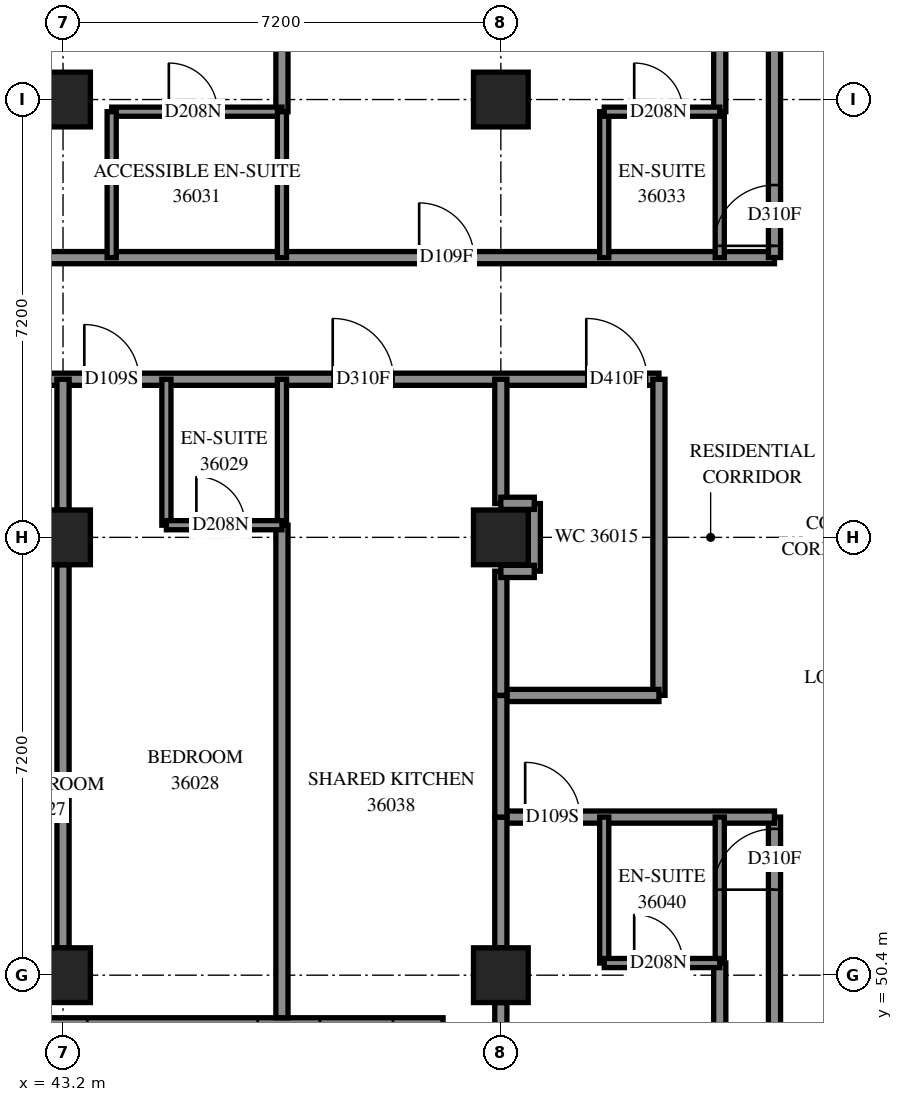
"""IFC4 building model, lengths in metres.
Left out: names, types, materials, properties, quantities, classifications, styles, units other than length and angle.
Written with IfcOpenShell. Run it as: python <this file> out.ifc"""

import sys

from ifc_helpers import new_model, si_unit, direction, frame, frame_2d, origin, origin_2d, place, context, subcontext, project, spatial, polyline, rectangle, outline, extrude, element, fill, save


model = new_model("IFC4")
c1 = context("Model", 3, precision=1e-05, world=origin(), true_north=direction((0.0, 1.0)))
c2 = subcontext(c1, "Body", "Model", "MODEL_VIEW")
j1 = project(units=[si_unit("LENGTHUNIT", "METRE"), si_unit("PLANEANGLEUNIT", "RADIAN")], contexts=[c1])
p1 = place(None, origin())
s1 = spatial("IfcSite", under=j1, at=p1, CompositionType="ELEMENT")
p2 = place(p1, origin())
s2 = spatial("IfcBuilding", under=s1, at=p2, CompositionType="ELEMENT")
p3 = place(p2, frame((0.0, 0.0, 135.4)))
s3 = spatial("IfcBuildingStorey", under=s2, at=p3, CompositionType="ELEMENT", Elevation=135.4)
for number, where, z_axis, x_axis in (
    (1, (43.2, 50.4, 0.0), (0.0, 0.0, 1.0), (1.0, 0.0, 0.0)),
    (2, (43.2, 57.6, 0.0), (0.0, 0.0, 1.0), (1.0, 0.0, 0.0)),
    (3, (43.2, 64.8, 0.0), (0.0, 0.0, 1.0), (1.0, 0.0, 0.0)),
    (4, (50.4, 50.4, 0.0), (0.0, 0.0, 1.0), (1.0, 0.0, 0.0)),
    (5, (50.4, 57.6, 0.0), (0.0, 0.0, 1.0), (1.0, 0.0, 0.0)),
    (6, (50.4, 64.8, 0.0), (0.0, 0.0, 1.0), (1.0, 0.0, 0.0)),
):
    element("IfcColumn", number, at=place(p3, frame(where, z_axis=z_axis, x_axis=x_axis)), inside=s3, PredefinedType="COLUMN", context=c2, shape_type="SweptSolid", body=[
        extrude(rectangle(XDim=0.9, YDim=0.9, at=origin_2d()), origin(), (0.0, 0.0, 1.0), 3.1),
    ])
p4 = place(p3, frame((42.25, 49.45, 0.0), z_axis=(0.0, 0.0, 1.0), x_axis=(1.0, 0.0, 0.0)))
e7 = element("IfcWall", 7, at=p4, inside=s3, PredefinedType="SOLIDWALL", context=c2, shape_type="SweptSolid", body=[
    extrude(outline(polyline([(-0.25, -0.25), (6.95, -0.25), (7.45, 0.25), (0.25, 0.25), (-0.25, -0.25)])), origin(), (0.0, 0.0, 1.0), 3.1),
])
p5 = place(p4, frame((1.35, 0.0, 0.45)))
e8 = element("IfcOpeningElement", 8, at=p5, cuts=e7, PredefinedType="OPENING", context=c2, shape_type="SweptSolid", body=[
    extrude(rectangle(XDim=2.8, YDim=2.5, at=frame_2d((1.4, 1.25))), frame((0.0, 0.26, 0.0), z_axis=(0.0, -1.0, 0.0), x_axis=(1.0, 0.0, 0.0)), (0.0, 0.0, 1.0), 0.52),
])
p6 = place(p4, frame((5.175, 0.0, 0.45)))
e9 = element("IfcOpeningElement", 9, at=p6, cuts=e7, PredefinedType="OPENING", context=c2, shape_type="SweptSolid", body=[
    extrude(rectangle(XDim=1.2, YDim=2.5, at=frame_2d((0.6, 1.25))), frame((0.0, 0.26, 0.0), z_axis=(0.0, -1.0, 0.0), x_axis=(1.0, 0.0, 0.0)), (0.0, 0.0, 1.0), 0.52),
])
p7 = place(p3, frame((49.45, 49.45, 0.0), z_axis=(0.0, 0.0, 1.0), x_axis=(0.0, -1.0, 0.0)))
e10 = element("IfcWall", 10, at=p7, inside=s3, PredefinedType="SOLIDWALL", context=c2, shape_type="SweptSolid", body=[
    extrude(outline(polyline([(0.25, -0.25), (8.35, -0.25), (7.702, 0.25), (-0.25, 0.25), (0.25, -0.25)])), origin(), (0.0, 0.0, 1.0), 3.1),
])
p8 = place(p7, frame((3.05, 0.0, 0.45)))
e11 = element("IfcOpeningElement", 11, at=p8, cuts=e10, PredefinedType="OPENING", context=c2, shape_type="SweptSolid", body=[
    extrude(rectangle(XDim=2.8, YDim=2.5, at=frame_2d((1.4, 1.25))), frame((0.0, 0.26, 0.0), z_axis=(0.0, -1.0, 0.0), x_axis=(1.0, 0.0, 0.0)), (0.0, 0.0, 1.0), 0.52),
])
p9 = place(p7, frame((0.825, 0.0, 0.45)))
e12 = element("IfcOpeningElement", 12, at=p9, cuts=e10, PredefinedType="OPENING", context=c2, shape_type="SweptSolid", body=[
    extrude(rectangle(XDim=1.2, YDim=2.5, at=frame_2d((0.6, 1.25))), frame((0.0, 0.26, 0.0), z_axis=(0.0, -1.0, 0.0), x_axis=(1.0, 0.0, 0.0)), (0.0, 0.0, 1.0), 0.52),
])
p10 = place(p3, frame((36.0, 60.2, 0.0), z_axis=(0.0, 0.0, 1.0), x_axis=(1.0, 0.0, 0.0)))
e13 = element("IfcWall", 13, at=p10, inside=s3, PredefinedType="PARTITIONING", context=c2, shape_type="SweptSolid", body=[
    extrude(rectangle(XDim=17.0, YDim=0.2, at=frame_2d((8.5, 0.0))), origin(), (0.0, 0.0, 1.0), 3.1),
])
p11 = place(p10, frame((15.805, 0.0, 0.0)))
e14 = element("IfcOpeningElement", 14, at=p11, cuts=e13, PredefinedType="OPENING", context=c2, shape_type="SweptSolid", body=[
    extrude(rectangle(XDim=1.0, YDim=2.1, at=frame_2d((0.5, 1.05))), frame((0.0, 0.11, 0.0), z_axis=(0.0, -1.0, 0.0), x_axis=(1.0, 0.0, 0.0)), (0.0, 0.0, 1.0), 0.22),
])
p12 = place(p10, frame((4.125, 0.0, 0.0)))
e15 = element("IfcOpeningElement", 15, at=p12, cuts=e13, PredefinedType="OPENING", context=c2, shape_type="SweptSolid", body=[
    extrude(rectangle(XDim=1.0, YDim=2.1, at=frame_2d((0.5, 1.05))), frame((0.0, 0.11, 0.0), z_axis=(0.0, -1.0, 0.0), x_axis=(1.0, 0.0, 0.0)), (0.0, 0.0, 1.0), 0.22),
])
p13 = place(p10, frame((7.55, 0.0, 0.0)))
e16 = element("IfcOpeningElement", 16, at=p13, cuts=e13, PredefinedType="OPENING", context=c2, shape_type="SweptSolid", body=[
    extrude(rectangle(XDim=0.9, YDim=2.1, at=frame_2d((0.45, 1.05))), frame((0.0, 0.11, 0.0), z_axis=(0.0, -1.0, 0.0), x_axis=(1.0, 0.0, 0.0)), (0.0, 0.0, 1.0), 0.22),
])
p14 = place(p10, frame((11.635, 0.0, 0.0)))
e17 = element("IfcOpeningElement", 17, at=p14, cuts=e13, PredefinedType="OPENING", context=c2, shape_type="SweptSolid", body=[
    extrude(rectangle(XDim=1.0, YDim=2.1, at=frame_2d((0.5, 1.05))), frame((0.0, 0.11, 0.0), z_axis=(0.0, -1.0, 0.0), x_axis=(1.0, 0.0, 0.0)), (0.0, 0.0, 1.0), 0.22),
])
p15 = place(p3, frame((40.602, 62.2, 0.0), z_axis=(0.0, 0.0, 1.0), x_axis=(1.0, 0.0, 0.0)))
e18 = element("IfcWall", 18, at=p15, inside=s3, PredefinedType="PARTITIONING", context=c2, shape_type="SweptSolid", body=[
    extrude(rectangle(XDim=14.298, YDim=0.2, at=frame_2d((7.149, 0.0))), origin(), (0.0, 0.0, 1.0), 3.1),
])
p16 = place(p15, frame((1.306, 0.0, 0.0)))
e19 = element("IfcOpeningElement", 19, at=p16, cuts=e18, PredefinedType="OPENING", context=c2, shape_type="SweptSolid", body=[
    extrude(rectangle(XDim=0.9, YDim=2.1, at=frame_2d((0.45, 1.05))), frame((0.0, 0.11, 0.0), z_axis=(0.0, -1.0, 0.0), x_axis=(1.0, 0.0, 0.0)), (0.0, 0.0, 1.0), 0.22),
])
p17 = place(p15, frame((8.455, 0.0, 0.0)))
e20 = element("IfcOpeningElement", 20, at=p17, cuts=e18, PredefinedType="OPENING", context=c2, shape_type="SweptSolid", body=[
    extrude(rectangle(XDim=0.9, YDim=2.1, at=frame_2d((0.45, 1.05))), frame((0.0, 0.11, 0.0), z_axis=(0.0, -1.0, 0.0), x_axis=(1.0, 0.0, 0.0)), (0.0, 0.0, 1.0), 0.22),
])
p18 = place(p3, frame((54.0, 42.381, 0.0), z_axis=(0.0, 0.0, 1.0), x_axis=(0.0, 1.0, 0.0)))
e21 = element("IfcWall", 21, at=p18, inside=s3, PredefinedType="PARTITIONING", context=c2, shape_type="SweptSolid", body=[
    extrude(rectangle(XDim=8.219, YDim=0.2, at=frame_2d((4.109, 0.0))), origin(), (0.0, 0.0, 1.0), 3.1),
])
p19 = place(p3, frame((46.8, 64.6, 0.0), z_axis=(0.0, 0.0, 1.0), x_axis=(0.0, 1.0, 0.0)))
e22 = element("IfcWall", 22, at=p19, inside=s3, PredefinedType="PARTITIONING", context=c2, shape_type="SweptSolid", body=[
    extrude(rectangle(XDim=8.162, YDim=0.2, at=frame_2d((4.081, 0.0))), origin(), (0.0, 0.0, 1.0), 3.1),
])
p20 = place(p3, frame((54.0, 64.6, 0.0), z_axis=(0.0, 0.0, 1.0), x_axis=(0.0, 1.0, 0.0)))
e23 = element("IfcWall", 23, at=p20, inside=s3, PredefinedType="PARTITIONING", context=c2, shape_type="SweptSolid", body=[
    extrude(rectangle(XDim=8.133, YDim=0.2, at=frame_2d((4.066, 0.0))), origin(), (0.0, 0.0, 1.0), 3.1),
])
p21 = place(p3, frame((46.8, 49.7, 0.0), z_axis=(0.0, 0.0, 1.0), x_axis=(0.0, 1.0, 0.0)))
e24 = element("IfcWall", 24, at=p21, inside=s3, PredefinedType="PARTITIONING", context=c2, shape_type="SweptSolid", body=[
    extrude(rectangle(XDim=8.1, YDim=0.2, at=frame_2d((4.05, 0.0))), origin(), (0.0, 0.0, 1.0), 3.1),
])
for number, where, z_axis, x_axis in (
    (25, (50.4, 43.65, 0.0), (0.0, 0.0, 1.0), (0.0, 1.0, 0.0)),
    (26, (43.2, 50.85, 0.0), (0.0, 0.0, 1.0), (0.0, 1.0, 0.0)),
):
    element("IfcWall", number, at=place(p3, frame(where, z_axis=z_axis, x_axis=x_axis)), inside=s3, PredefinedType="PARTITIONING", context=c2, shape_type="SweptSolid", body=[
        extrude(rectangle(XDim=6.3, YDim=0.2, at=frame_2d((3.15, 0.0))), origin(), (0.0, 0.0, 1.0), 2.6),
    ])
p22 = place(p3, frame((54.9, 47.7, 0.0), z_axis=(0.0, 0.0, 1.0), x_axis=(0.0, 1.0, 0.0)))
e27 = element("IfcWall", 27, at=p22, inside=s3, PredefinedType="PARTITIONING", context=c2, shape_type="SweptSolid", body=[
    extrude(rectangle(XDim=5.3, YDim=0.2, at=frame_2d((2.65, 0.0))), origin(), (0.0, 0.0, 1.0), 3.1),
])
p23 = place(p22, frame((4.106, 0.0, 0.0)))
e28 = element("IfcOpeningElement", 28, at=p23, cuts=e27, PredefinedType="OPENING", context=c2, shape_type="SweptSolid", body=[
    extrude(rectangle(XDim=1.0, YDim=2.1, at=frame_2d((0.5, 1.05))), frame((0.0, 0.11, 0.0), z_axis=(0.0, -1.0, 0.0), x_axis=(1.0, 0.0, 0.0)), (0.0, 0.0, 1.0), 0.22),
])
p24 = place(p3, frame((54.9, 62.202, 0.0), z_axis=(0.0, 0.0, 1.0), x_axis=(0.0, 1.0, 0.0)))
e29 = element("IfcWall", 29, at=p24, inside=s3, PredefinedType="PARTITIONING", context=c2, shape_type="SweptSolid", body=[
    extrude(rectangle(XDim=5.298, YDim=0.2, at=frame_2d((2.649, 0.0))), origin(), (0.0, 0.0, 1.0), 3.1),
])
p25 = place(p24, frame((0.192, 0.0, 0.0)))
e30 = element("IfcOpeningElement", 30, at=p25, cuts=e29, PredefinedType="OPENING", context=c2, shape_type="SweptSolid", body=[
    extrude(rectangle(XDim=1.0, YDim=2.1, at=frame_2d((0.5, 1.05))), frame((0.0, 0.11, 0.0), z_axis=(0.0, -1.0, 0.0), x_axis=(1.0, 0.0, 0.0)), (0.0, 0.0, 1.0), 0.22),
])
p26 = place(p3, frame((53.0, 55.002, 0.0), z_axis=(0.0, 0.0, 1.0), x_axis=(0.0, 1.0, 0.0)))
e31 = element("IfcWall", 31, at=p26, inside=s3, PredefinedType="PARTITIONING", context=c2, shape_type="SweptSolid", body=[
    extrude(rectangle(XDim=5.198, YDim=0.2, at=frame_2d((2.599, 0.0))), origin(), (0.0, 0.0, 1.0), 3.1),
])
p27 = place(p3, frame((50.4, 53.0, 0.0), z_axis=(0.0, 0.0, 1.0), x_axis=(1.0, 0.0, 0.0)))
e32 = element("IfcWall", 32, at=p27, inside=s3, PredefinedType="PARTITIONING", context=c2, shape_type="SweptSolid", body=[
    extrude(rectangle(XDim=4.5, YDim=0.2, at=frame_2d((2.25, 0.0))), origin(), (0.0, 0.0, 1.0), 3.1),
])
p28 = place(p27, frame((0.4, 0.0, 0.0)))
e33 = element("IfcOpeningElement", 33, at=p28, cuts=e32, PredefinedType="OPENING", context=c2, shape_type="SweptSolid", body=[
    extrude(rectangle(XDim=0.9, YDim=2.1, at=frame_2d((0.45, 1.05))), frame((0.0, 0.11, 0.0), z_axis=(0.0, -1.0, 0.0), x_axis=(1.0, 0.0, 0.0)), (0.0, 0.0, 1.0), 0.22),
])
p29 = place(p3, frame((44.0, 64.6, 0.0), z_axis=(0.0, 0.0, 1.0), x_axis=(1.0, 0.0, 0.0)))
e34 = element("IfcWall", 34, at=p29, inside=s3, PredefinedType="PARTITIONING", context=c2, shape_type="SweptSolid", body=[
    extrude(rectangle(XDim=2.8, YDim=0.15, at=frame_2d((1.4, 0.0))), origin(), (0.0, 0.0, 1.0), 3.1),
])
p30 = place(p29, frame((0.94, 0.0, 0.0)))
e35 = element("IfcOpeningElement", 35, at=p30, cuts=e34, PredefinedType="OPENING", context=c2, shape_type="SweptSolid", body=[
    extrude(rectangle(XDim=0.8, YDim=2.1, at=frame_2d((0.4, 1.05))), frame((0.0, 0.085, 0.0), z_axis=(0.0, -1.0, 0.0), x_axis=(1.0, 0.0, 0.0)), (0.0, 0.0, 1.0), 0.17),
])
p31 = place(p3, frame((50.4, 55.0, 0.0), z_axis=(0.0, 0.0, 1.0), x_axis=(1.0, 0.0, 0.0)))
e36 = element("IfcWall", 36, at=p31, inside=s3, PredefinedType="PARTITIONING", context=c2, shape_type="SweptSolid", body=[
    extrude(rectangle(XDim=2.6, YDim=0.2, at=frame_2d((1.3, 0.0))), origin(), (0.0, 0.0, 1.0), 3.1),
])
for number, where, z_axis, x_axis in (
    (37, (44.9, 57.8, 0.0), (0.0, 0.0, 1.0), (0.0, 1.0, 0.0)),
    (38, (46.8, 57.8, 0.0), (0.0, 0.0, 1.0), (0.0, 1.0, 0.0)),
    (39, (52.1, 50.6, 0.0), (0.0, 0.0, 1.0), (0.0, 1.0, 0.0)),
    (40, (54.0, 50.6, 0.0), (0.0, 0.0, 1.0), (0.0, 1.0, 0.0)),
    (41, (44.0, 62.2, 0.0), (0.0, 0.0, 1.0), (0.0, 1.0, 0.0)),
    (42, (46.8, 62.2, 0.0), (0.0, 0.0, 1.0), (0.0, 1.0, 0.0)),
    (43, (52.1, 62.2, 0.0), (0.0, 0.0, 1.0), (0.0, 1.0, 0.0)),
    (44, (54.0, 62.2, 0.0), (0.0, 0.0, 1.0), (0.0, 1.0, 0.0)),
):
    element("IfcWall", number, at=place(p3, frame(where, z_axis=z_axis, x_axis=x_axis)), inside=s3, PredefinedType="PARTITIONING", context=c2, shape_type="SweptSolid", body=[
        extrude(rectangle(XDim=2.4, YDim=0.15, at=frame_2d((1.2, 0.0))), origin(), (0.0, 0.0, 1.0), 3.1),
    ])
for number, where, z_axis, x_axis in (
    (45, (43.2, 58.05, 0.0), (0.0, 0.0, 1.0), (0.0, 1.0, 0.0)),
    (46, (50.4, 50.85, 0.0), (0.0, 0.0, 1.0), (0.0, 1.0, 0.0)),
):
    element("IfcWall", number, at=place(p3, frame(where, z_axis=z_axis, x_axis=x_axis)), inside=s3, PredefinedType="PARTITIONING", context=c2, shape_type="SweptSolid", body=[
        extrude(rectangle(XDim=2.15, YDim=0.2, at=frame_2d((1.075, 0.0))), origin(), (0.0, 0.0, 1.0), 3.1),
    ])
for number, where, z_axis, x_axis in (
    (47, (50.4, 58.156, 0.0), (0.0, 0.0, 1.0), (0.0, 1.0, 0.0)),
    (48, (50.4, 55.0, 0.0), (0.0, 0.0, 1.0), (0.0, 1.0, 0.0)),
):
    element("IfcWall", number, at=place(p3, frame(where, z_axis=z_axis, x_axis=x_axis)), inside=s3, PredefinedType="PARTITIONING", context=c2, shape_type="SweptSolid", body=[
        extrude(rectangle(XDim=2.044, YDim=0.2, at=frame_2d((1.022, 0.0))), origin(), (0.0, 0.0, 1.0), 3.1),
    ])
p32 = place(p3, frame((50.4, 53.0, 0.0), z_axis=(0.0, 0.0, 1.0), x_axis=(0.0, 1.0, 0.0)))
e49 = element("IfcWall", 49, at=p32, inside=s3, PredefinedType="PARTITIONING", context=c2, shape_type="SweptSolid", body=[
    extrude(rectangle(XDim=2.0, YDim=0.2, at=frame_2d((1.0, 0.0))), origin(), (0.0, 0.0, 1.0), 3.1),
])
p33 = place(p3, frame((52.1, 64.6, 0.0), z_axis=(0.0, 0.0, 1.0), x_axis=(1.0, 0.0, 0.0)))
e50 = element("IfcWall", 50, at=p33, inside=s3, PredefinedType="PARTITIONING", context=c2, shape_type="SweptSolid", body=[
    extrude(rectangle(XDim=1.9, YDim=0.15, at=frame_2d((0.95, 0.0))), origin(), (0.0, 0.0, 1.0), 3.1),
])
p34 = place(p33, frame((0.493, 0.0, 0.0)))
e51 = element("IfcOpeningElement", 51, at=p34, cuts=e50, PredefinedType="OPENING", context=c2, shape_type="SweptSolid", body=[
    extrude(rectangle(XDim=0.8, YDim=2.1, at=frame_2d((0.4, 1.05))), frame((0.0, 0.085, 0.0), z_axis=(0.0, -1.0, 0.0), x_axis=(1.0, 0.0, 0.0)), (0.0, 0.0, 1.0), 0.17),
])
p35 = place(p3, frame((44.9, 57.8, 0.0), z_axis=(0.0, 0.0, 1.0), x_axis=(1.0, 0.0, 0.0)))
e52 = element("IfcWall", 52, at=p35, inside=s3, PredefinedType="PARTITIONING", context=c2, shape_type="SweptSolid", body=[
    extrude(rectangle(XDim=1.9, YDim=0.15, at=frame_2d((0.95, 0.0))), origin(), (0.0, 0.0, 1.0), 3.1),
])
p36 = place(p35, frame((0.493, 0.0, 0.0)))
e53 = element("IfcOpeningElement", 53, at=p36, cuts=e52, PredefinedType="OPENING", context=c2, shape_type="SweptSolid", body=[
    extrude(rectangle(XDim=0.8, YDim=2.1, at=frame_2d((0.4, 1.05))), frame((0.0, 0.085, 0.0), z_axis=(0.0, -1.0, 0.0), x_axis=(1.0, 0.0, 0.0)), (0.0, 0.0, 1.0), 0.17),
])
p37 = place(p3, frame((52.1, 50.6, 0.0), z_axis=(0.0, 0.0, 1.0), x_axis=(1.0, 0.0, 0.0)))
e54 = element("IfcWall", 54, at=p37, inside=s3, PredefinedType="PARTITIONING", context=c2, shape_type="SweptSolid", body=[
    extrude(rectangle(XDim=1.9, YDim=0.15, at=frame_2d((0.95, 0.0))), origin(), (0.0, 0.0, 1.0), 3.1),
])
p38 = place(p37, frame((0.493, 0.0, 0.0)))
e55 = element("IfcOpeningElement", 55, at=p38, cuts=e54, PredefinedType="OPENING", context=c2, shape_type="SweptSolid", body=[
    extrude(rectangle(XDim=0.8, YDim=2.1, at=frame_2d((0.4, 1.05))), frame((0.0, 0.085, 0.0), z_axis=(0.0, -1.0, 0.0), x_axis=(1.0, 0.0, 0.0)), (0.0, 0.0, 1.0), 0.17),
])
p39 = place(p3, frame((50.95, 57.044, 0.0), z_axis=(0.0, 0.0, 1.0), x_axis=(0.0, 1.0, 0.0)))
e56 = element("IfcWall", 56, at=p39, inside=s3, PredefinedType="PARTITIONING", context=c2, shape_type="SweptSolid", body=[
    extrude(rectangle(XDim=1.112, YDim=0.2, at=frame_2d((0.556, 0.0))), origin(), (0.0, 0.0, 1.0), 3.1),
])
for number, where, z_axis, x_axis in (
    (57, (50.4, 57.04, 0.0), (0.0, 0.0, 1.0), (1.0, 0.0, 0.0)),
    (58, (50.4, 58.16, 0.0), (0.0, 0.0, 1.0), (1.0, 0.0, 0.0)),
):
    element("IfcWall", number, at=place(p3, frame(where, z_axis=z_axis, x_axis=x_axis)), inside=s3, PredefinedType="PARTITIONING", context=c2, shape_type="SweptSolid", body=[
        extrude(rectangle(XDim=0.55, YDim=0.2, at=frame_2d((0.275, 0.0))), origin(), (0.0, 0.0, 1.0), 3.1),
    ])
p40 = place(p5, origin())
e59 = element("IfcWindow", 59, at=p40, inside=s3, PartitioningType="SINGLE_PANEL", PredefinedType="WINDOW", context=c2, shape_type="SweptSolid", body=[
    extrude(rectangle(XDim=2.8, YDim=2.5, at=frame_2d((1.4, 1.25))), frame((0.0, 0.18, 0.0), z_axis=(0.0, -1.0, 0.0), x_axis=(1.0, 0.0, 0.0)), (0.0, 0.0, 1.0), 0.06),
])
fill(e8, e59)
p41 = place(p6, origin())
e60 = element("IfcWindow", 60, at=p41, inside=s3, PartitioningType="SINGLE_PANEL", PredefinedType="WINDOW", context=c2, shape_type="SweptSolid", body=[
    extrude(rectangle(XDim=1.2, YDim=2.5, at=frame_2d((0.6, 1.25))), frame((0.0, 0.18, 0.0), z_axis=(0.0, -1.0, 0.0), x_axis=(1.0, 0.0, 0.0)), (0.0, 0.0, 1.0), 0.06),
])
fill(e9, e60)
p42 = place(p11, origin())
e61 = element("IfcDoor", 61, at=p42, inside=s3, OperationType="SINGLE_SWING_LEFT", PredefinedType="DOOR", context=c2, shape_type="SweptSolid", body=[
    extrude(rectangle(XDim=1.0, YDim=2.1, at=frame_2d((0.5, 1.05))), frame((0.0, 0.025, 0.0), z_axis=(0.0, -1.0, 0.0), x_axis=(1.0, 0.0, 0.0)), (0.0, 0.0, 1.0), 0.05),
])
fill(e14, e61)
p43 = place(p13, origin())
e62 = element("IfcDoor", 62, at=p43, inside=s3, OperationType="SINGLE_SWING_LEFT", PredefinedType="DOOR", context=c2, shape_type="SweptSolid", body=[
    extrude(rectangle(XDim=0.9, YDim=2.1, at=frame_2d((0.45, 1.05))), frame((0.0, 0.025, 0.0), z_axis=(0.0, -1.0, 0.0), x_axis=(1.0, 0.0, 0.0)), (0.0, 0.0, 1.0), 0.05),
])
fill(e16, e62)
p44 = place(p36, origin())
e63 = element("IfcDoor", 63, at=p44, inside=s3, OperationType="SINGLE_SWING_RIGHT", PredefinedType="DOOR", context=c2, shape_type="SweptSolid", body=[
    extrude(rectangle(XDim=0.8, YDim=2.1, at=frame_2d((0.4, 1.05))), frame((0.0, 0.025, 0.0), z_axis=(0.0, -1.0, 0.0), x_axis=(1.0, 0.0, 0.0)), (0.0, 0.0, 1.0), 0.05),
])
fill(e53, e63)
p45 = place(p30, origin())
e64 = element("IfcDoor", 64, at=p45, inside=s3, OperationType="SINGLE_SWING_RIGHT", PredefinedType="DOOR", context=c2, shape_type="SweptSolid", body=[
    extrude(rectangle(XDim=0.8, YDim=2.1, at=frame_2d((0.4, 1.05))), frame((0.0, 0.025, 0.0), z_axis=(0.0, -1.0, 0.0), x_axis=(1.0, 0.0, 0.0)), (0.0, 0.0, 1.0), 0.05),
])
fill(e35, e64)
p46 = place(p17, origin())
e65 = element("IfcDoor", 65, at=p46, inside=s3, OperationType="SINGLE_SWING_LEFT", PredefinedType="DOOR", context=c2, shape_type="SweptSolid", body=[
    extrude(rectangle(XDim=0.9, YDim=2.1, at=frame_2d((0.45, 1.05))), frame((0.0, 0.025, 0.0), z_axis=(0.0, -1.0, 0.0), x_axis=(1.0, 0.0, 0.0)), (0.0, 0.0, 1.0), 0.05),
])
fill(e20, e65)
p47 = place(p34, origin())
e66 = element("IfcDoor", 66, at=p47, inside=s3, OperationType="SINGLE_SWING_RIGHT", PredefinedType="DOOR", context=c2, shape_type="SweptSolid", body=[
    extrude(rectangle(XDim=0.8, YDim=2.1, at=frame_2d((0.4, 1.05))), frame((0.0, 0.025, 0.0), z_axis=(0.0, -1.0, 0.0), x_axis=(1.0, 0.0, 0.0)), (0.0, 0.0, 1.0), 0.05),
])
fill(e51, e66)
p48 = place(p25, origin())
e67 = element("IfcDoor", 67, at=p48, inside=s3, OperationType="SINGLE_SWING_LEFT", PredefinedType="DOOR", context=c2, shape_type="SweptSolid", body=[
    extrude(rectangle(XDim=1.0, YDim=2.1, at=frame_2d((0.5, 1.05))), frame((0.0, 0.025, 0.0), z_axis=(0.0, -1.0, 0.0), x_axis=(1.0, 0.0, 0.0)), (0.0, 0.0, 1.0), 0.05),
])
fill(e30, e67)
p49 = place(p14, origin())
e68 = element("IfcDoor", 68, at=p49, inside=s3, OperationType="SINGLE_SWING_RIGHT", PredefinedType="DOOR", context=c2, shape_type="SweptSolid", body=[
    extrude(rectangle(XDim=1.0, YDim=2.1, at=frame_2d((0.5, 1.05))), frame((0.0, 0.025, 0.0), z_axis=(0.0, -1.0, 0.0), x_axis=(1.0, 0.0, 0.0)), (0.0, 0.0, 1.0), 0.05),
])
fill(e17, e68)
p50 = place(p28, origin())
e69 = element("IfcDoor", 69, at=p50, inside=s3, OperationType="SINGLE_SWING_LEFT", PredefinedType="DOOR", context=c2, shape_type="SweptSolid", body=[
    extrude(rectangle(XDim=0.9, YDim=2.1, at=frame_2d((0.45, 1.05))), frame((0.0, 0.025, 0.0), z_axis=(0.0, -1.0, 0.0), x_axis=(1.0, 0.0, 0.0)), (0.0, 0.0, 1.0), 0.05),
])
fill(e33, e69)
p51 = place(p38, origin())
e70 = element("IfcDoor", 70, at=p51, inside=s3, OperationType="SINGLE_SWING_RIGHT", PredefinedType="DOOR", context=c2, shape_type="SweptSolid", body=[
    extrude(rectangle(XDim=0.8, YDim=2.1, at=frame_2d((0.4, 1.05))), frame((0.0, 0.025, 0.0), z_axis=(0.0, -1.0, 0.0), x_axis=(1.0, 0.0, 0.0)), (0.0, 0.0, 1.0), 0.05),
])
fill(e55, e70)
p52 = place(p23, origin())
e71 = element("IfcDoor", 71, at=p52, inside=s3, OperationType="SINGLE_SWING_RIGHT", PredefinedType="DOOR", context=c2, shape_type="SweptSolid", body=[
    extrude(rectangle(XDim=1.0, YDim=2.1, at=frame_2d((0.5, 1.05))), frame((0.0, 0.025, 0.0), z_axis=(0.0, -1.0, 0.0), x_axis=(1.0, 0.0, 0.0)), (0.0, 0.0, 1.0), 0.05),
])
fill(e28, e71)
save(model, sys.argv[1])
